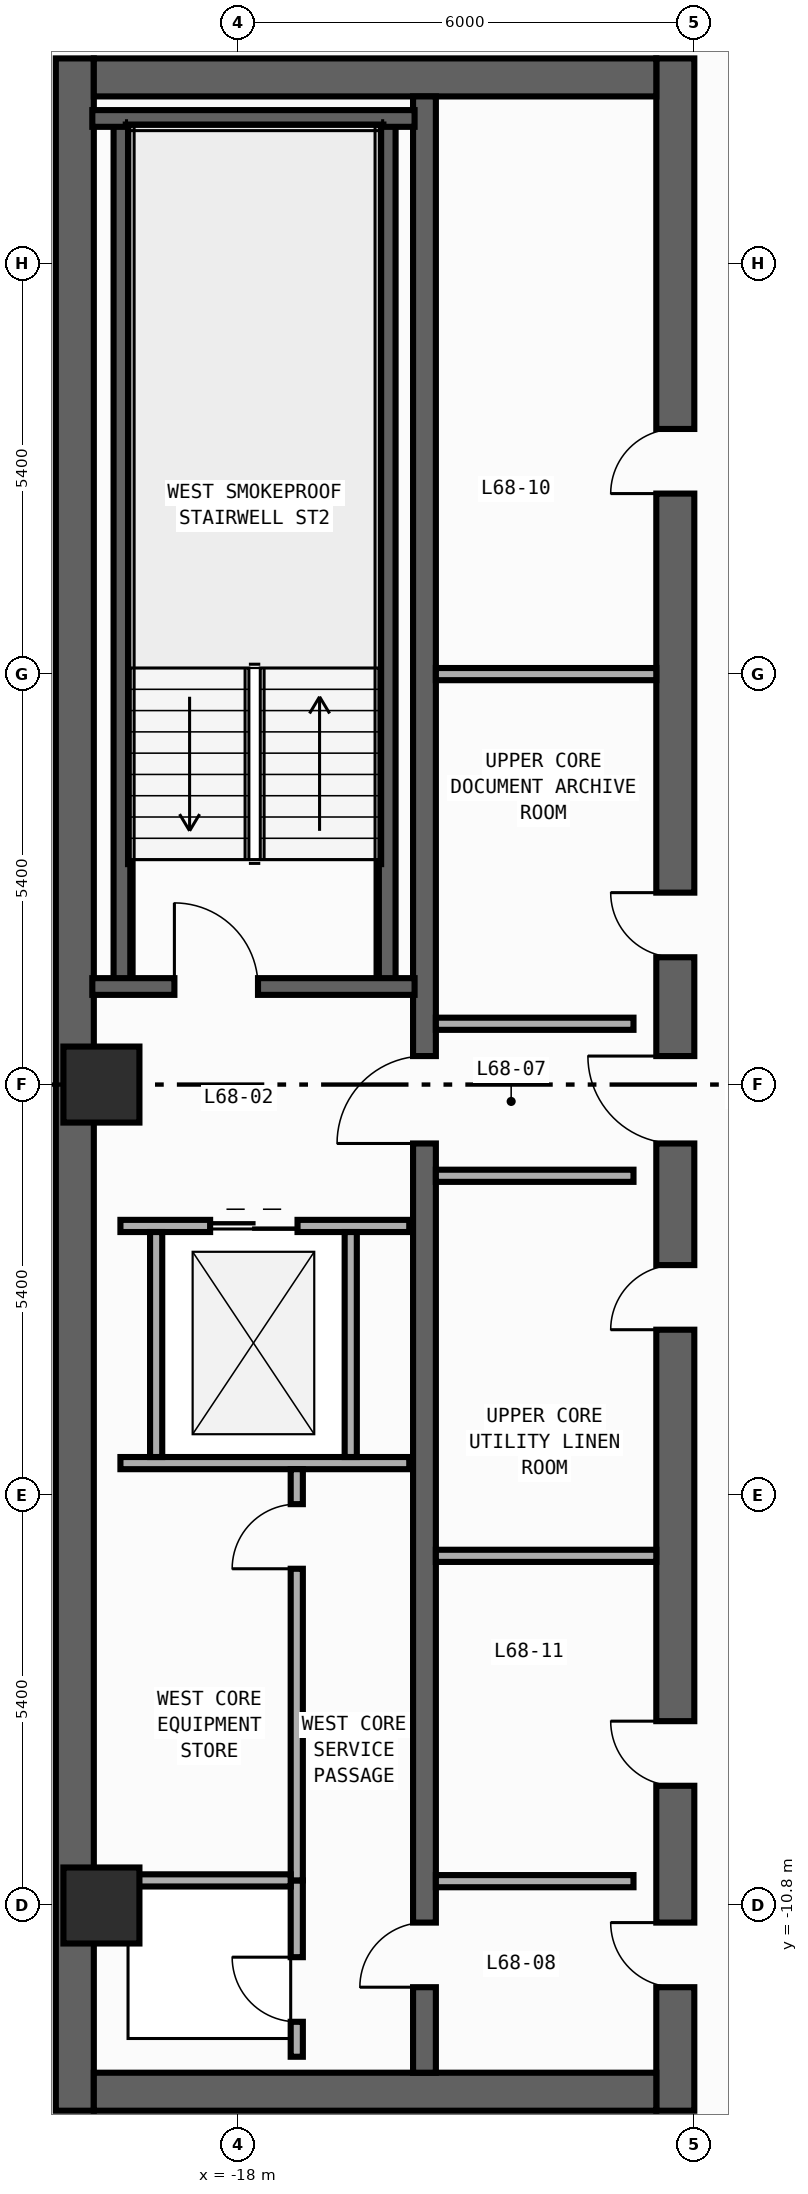
"""IFC4 building model, lengths in metres.
Left out: names, types, materials, properties, quantities, classifications, styles, units other than length and angle.
Written with IfcOpenShell. Run it as: python <this file> out.ifc"""

import sys

from ifc_helpers import new_model, si_unit, direction, frame, frame_2d, origin, origin_2d, place, context, subcontext, project, spatial, rectangle, circle, extrude, element, fill, save


model = new_model("IFC4")
c1 = context("Model", 3, precision=1e-05, world=origin(), true_north=direction((0.0, 1.0)))
c2 = subcontext(c1, "Body", "Model", "MODEL_VIEW")
j1 = project(units=[si_unit("LENGTHUNIT", "METRE"), si_unit("PLANEANGLEUNIT", "RADIAN")], contexts=[c1])
p1 = place(None, origin())
s1 = spatial("IfcSite", under=j1, at=p1, CompositionType="ELEMENT")
p2 = place(p1, origin())
s2 = spatial("IfcBuilding", under=s1, at=p2, CompositionType="ELEMENT")
p3 = place(p2, frame((0.0, 0.0, 285.2)))
s3 = spatial("IfcBuildingStorey", under=s2, at=p3, CompositionType="ELEMENT", Elevation=285.2)
p4 = place(p3, frame((-20.15, -13.5, 0.0), z_axis=(0.0, 0.0, 1.0), x_axis=(0.0, 1.0, 0.0)))
e1 = element("IfcWall", 1, at=p4, inside=s3, PredefinedType="SHEAR", context=c2, shape_type="SweptSolid", body=[
    extrude(rectangle(XDim=27.0, YDim=0.5, at=frame_2d((13.5, 0.0))), origin(), (0.0, 0.0, 1.0), 3.54),
])
p5 = place(p3, frame((-12.25, -13.5, 0.0), z_axis=(0.0, 0.0, 1.0), x_axis=(0.0, 1.0, 0.0)))
e2 = element("IfcWall", 2, at=p5, inside=s3, PredefinedType="SHEAR", context=c2, shape_type="SweptSolid", body=[
    extrude(rectangle(XDim=27.0, YDim=0.5, at=frame_2d((13.5, 0.0))), origin(), (0.0, 0.0, 1.0), 3.54),
])
p6 = place(p5, frame((15.175, 0.0, 0.0)))
e3 = element("IfcOpeningElement", 3, at=p6, cuts=e2, PredefinedType="OPENING", context=c2, shape_type="SweptSolid", body=[
    extrude(rectangle(XDim=0.85, YDim=2.1, at=frame_2d((0.425, 1.05))), frame((0.0, 0.26, 0.0), z_axis=(0.0, -1.0, 0.0), x_axis=(1.0, 0.0, 0.0)), (0.0, 0.0, 1.0), 0.52),
])
p7 = place(p5, frame((21.275, 0.0, 0.0)))
e4 = element("IfcOpeningElement", 4, at=p7, cuts=e2, PredefinedType="OPENING", context=c2, shape_type="SweptSolid", body=[
    extrude(rectangle(XDim=0.85, YDim=2.1, at=frame_2d((0.425, 1.05))), frame((0.0, 0.26, 0.0), z_axis=(0.0, -1.0, 0.0), x_axis=(1.0, 0.0, 0.0)), (0.0, 0.0, 1.0), 0.52),
])
p8 = place(p5, frame((4.275, 0.0, 0.0)))
e5 = element("IfcOpeningElement", 5, at=p8, cuts=e2, PredefinedType="OPENING", context=c2, shape_type="SweptSolid", body=[
    extrude(rectangle(XDim=0.85, YDim=2.1, at=frame_2d((0.425, 1.05))), frame((0.0, 0.26, 0.0), z_axis=(0.0, -1.0, 0.0), x_axis=(1.0, 0.0, 0.0)), (0.0, 0.0, 1.0), 0.52),
])
p9 = place(p5, frame((10.275, 0.0, 0.0)))
e6 = element("IfcOpeningElement", 6, at=p9, cuts=e2, PredefinedType="OPENING", context=c2, shape_type="SweptSolid", body=[
    extrude(rectangle(XDim=0.85, YDim=2.1, at=frame_2d((0.425, 1.05))), frame((0.0, 0.26, 0.0), z_axis=(0.0, -1.0, 0.0), x_axis=(1.0, 0.0, 0.0)), (0.0, 0.0, 1.0), 0.52),
])
p10 = place(p5, frame((12.725, 0.0, 0.0)))
e7 = element("IfcOpeningElement", 7, at=p10, cuts=e2, PredefinedType="OPENING", context=c2, shape_type="SweptSolid", body=[
    extrude(rectangle(XDim=1.15, YDim=2.2, at=frame_2d((0.575, 1.1))), frame((0.0, 0.26, 0.0), z_axis=(0.0, -1.0, 0.0), x_axis=(1.0, 0.0, 0.0)), (0.0, 0.0, 1.0), 0.52),
])
p11 = place(p5, frame((1.625, 0.0, 0.0)))
e8 = element("IfcOpeningElement", 8, at=p11, cuts=e2, PredefinedType="OPENING", context=c2, shape_type="SweptSolid", body=[
    extrude(rectangle(XDim=0.85, YDim=2.1, at=frame_2d((0.425, 1.05))), frame((0.0, 0.26, 0.0), z_axis=(0.0, -1.0, 0.0), x_axis=(1.0, 0.0, 0.0)), (0.0, 0.0, 1.0), 0.52),
])
for number, where, z_axis, x_axis in (
    (9, (-19.9, -13.25, 0.0), (0.0, 0.0, 1.0), (1.0, 0.0, 0.0)),
    (10, (-19.9, 13.25, 0.0), (0.0, 0.0, 1.0), (1.0, 0.0, 0.0)),
):
    element("IfcWall", number, at=place(p3, frame(where, z_axis=z_axis, x_axis=x_axis)), inside=s3, PredefinedType="SHEAR", context=c2, shape_type="SweptSolid", body=[
        extrude(rectangle(XDim=7.4, YDim=0.5, at=frame_2d((3.7, 0.0))), origin(), (0.0, 0.0, 1.0), 3.54),
    ])
p12 = place(p3, frame((-15.55, -13.0, 0.0), z_axis=(0.0, 0.0, 1.0), x_axis=(0.0, 1.0, 0.0)))
e11 = element("IfcWall", 11, at=p12, inside=s3, PredefinedType="SHEAR", context=c2, shape_type="SweptSolid", body=[
    extrude(rectangle(XDim=26.0, YDim=0.3, at=frame_2d((13.0, 0.0))), origin(), (0.0, 0.0, 1.0), 3.54),
])
p13 = place(p12, frame((12.225, 0.0, 0.0)))
e12 = element("IfcOpeningElement", 12, at=p13, cuts=e11, PredefinedType="OPENING", context=c2, shape_type="SweptSolid", body=[
    extrude(rectangle(XDim=1.15, YDim=2.2, at=frame_2d((0.575, 1.1))), frame((0.0, 0.16, 0.0), z_axis=(0.0, -1.0, 0.0), x_axis=(1.0, 0.0, 0.0)), (0.0, 0.0, 1.0), 0.32),
])
p14 = place(p12, frame((1.125, 0.0, 0.0)))
e13 = element("IfcOpeningElement", 13, at=p14, cuts=e11, PredefinedType="OPENING", context=c2, shape_type="SweptSolid", body=[
    extrude(rectangle(XDim=0.85, YDim=2.1, at=frame_2d((0.425, 1.05))), frame((0.0, 0.16, 0.0), z_axis=(0.0, -1.0, 0.0), x_axis=(1.0, 0.0, 0.0)), (0.0, 0.0, 1.0), 0.32),
])
for number, where, z_axis, x_axis in (
    (14, (-16.04, 1.29, 0.0), (0.0, 0.0, 1.0), (0.0, 1.0, 0.0)),
    (15, (-19.53, 1.29, 0.0), (0.0, 0.0, 1.0), (0.0, 1.0, 0.0)),
):
    element("IfcWall", number, at=place(p3, frame(where, z_axis=z_axis, x_axis=x_axis)), inside=s3, PredefinedType="SHEAR", context=c2, shape_type="SweptSolid", body=[
        extrude(rectangle(XDim=11.42, YDim=0.22, at=frame_2d((5.71, 0.0))), origin(), (0.0, 0.0, 1.0), 3.54),
    ])
p15 = place(p3, frame((-19.92, 12.71, 0.0), z_axis=(0.0, 0.0, 1.0), x_axis=(1.0, 0.0, 0.0)))
e16 = element("IfcWall", 16, at=p15, inside=s3, PredefinedType="SHEAR", context=c2, shape_type="SweptSolid", body=[
    extrude(rectangle(XDim=4.24, YDim=0.22, at=frame_2d((2.12, 0.0))), origin(), (0.0, 0.0, 1.0), 3.54),
])
p16 = place(p3, frame((-19.92, 1.29, 0.0), z_axis=(0.0, 0.0, 1.0), x_axis=(1.0, 0.0, 0.0)))
e17 = element("IfcWall", 17, at=p16, inside=s3, PredefinedType="SHEAR", context=c2, shape_type="SweptSolid", body=[
    extrude(rectangle(XDim=4.24, YDim=0.22, at=frame_2d((2.12, 0.0))), origin(), (0.0, 0.0, 1.0), 3.54),
])
p17 = place(p16, frame((1.08, 0.0, 0.0)))
e18 = element("IfcOpeningElement", 18, at=p17, cuts=e17, PredefinedType="OPENING", context=c2, shape_type="SweptSolid", body=[
    extrude(rectangle(XDim=1.1, YDim=2.2, at=frame_2d((0.55, 1.1))), frame((0.0, 0.12, 0.0), z_axis=(0.0, -1.0, 0.0), x_axis=(1.0, 0.0, 0.0)), (0.0, 0.0, 1.0), 0.24),
])
for number, where, z_axis, x_axis in (
    (19, (-19.8, -10.8, 0.0), (0.0, 0.0, 1.0), (1.0, 0.0, 0.0)),
    (20, (-19.8, 0.0, 0.0), (0.0, 0.0, 1.0), (1.0, 0.0, 0.0)),
):
    element("IfcColumn", number, at=place(p3, frame(where, z_axis=z_axis, x_axis=x_axis)), inside=s3, PredefinedType="COLUMN", context=c2, shape_type="SweptSolid", body=[
        extrude(circle(Radius=0.5, at=origin_2d()), origin(), (0.0, 0.0, 1.0), 3.8),
    ])
p18 = place(p3, frame((-19.55, -1.86, 0.0), z_axis=(0.0, 0.0, 1.0), x_axis=(1.0, 0.0, 0.0)))
e21 = element("IfcWall", 21, at=p18, inside=s3, PredefinedType="STANDARD", context=c2, shape_type="SweptSolid", body=[
    extrude(rectangle(XDim=3.8, YDim=0.16, at=frame_2d((1.9, 0.0))), origin(), (0.0, 0.0, 1.0), 3.54),
])
p19 = place(p18, frame((1.18, 0.0, 0.0)))
e22 = element("IfcOpeningElement", 22, at=p19, cuts=e21, PredefinedType="OPENING", context=c2, shape_type="SweptSolid", body=[
    extrude(rectangle(XDim=1.15, YDim=2.2, at=frame_2d((0.575, 1.1))), frame((0.0, 0.09, 0.0), z_axis=(0.0, -1.0, 0.0), x_axis=(1.0, 0.0, 0.0)), (0.0, 0.0, 1.0), 0.18),
])
p20 = place(p3, frame((-19.55, -4.98, 0.0), z_axis=(0.0, 0.0, 1.0), x_axis=(1.0, 0.0, 0.0)))
e23 = element("IfcWall", 23, at=p20, inside=s3, PredefinedType="STANDARD", context=c2, shape_type="SweptSolid", body=[
    extrude(rectangle(XDim=3.8, YDim=0.16, at=frame_2d((1.9, 0.0))), origin(), (0.0, 0.0, 1.0), 3.54),
])
for number, where, z_axis, x_axis in (
    (24, (-19.08, -4.9, 0.0), (0.0, 0.0, 1.0), (0.0, 1.0, 0.0)),
    (25, (-16.52, -4.9, 0.0), (0.0, 0.0, 1.0), (0.0, 1.0, 0.0)),
):
    element("IfcWall", number, at=place(p3, frame(where, z_axis=z_axis, x_axis=x_axis)), inside=s3, PredefinedType="STANDARD", context=c2, shape_type="SweptSolid", body=[
        extrude(rectangle(XDim=2.96, YDim=0.16, at=frame_2d((1.48, 0.0))), origin(), (0.0, 0.0, 1.0), 3.54),
    ])
for number, where, z_axis, x_axis in (
    (26, (-15.4, 0.8, 0.0), (0.0, 0.0, 1.0), (1.0, 0.0, 0.0)),
    (27, (-15.4, -1.2, 0.0), (0.0, 0.0, 1.0), (1.0, 0.0, 0.0)),
    (28, (-15.4, -10.48, 0.0), (0.0, 0.0, 1.0), (1.0, 0.0, 0.0)),
):
    element("IfcWall", number, at=place(p3, frame(where, z_axis=z_axis, x_axis=x_axis)), inside=s3, PredefinedType="STANDARD", context=c2, shape_type="SweptSolid", body=[
        extrude(rectangle(XDim=2.6, YDim=0.16, at=frame_2d((1.3, 0.0))), origin(), (0.0, 0.0, 1.0), 3.54),
    ])
p21 = place(p3, frame((-17.23, -12.79, 0.0), z_axis=(0.0, 0.0, 1.0), x_axis=(0.0, 1.0, 0.0)))
e29 = element("IfcWall", 29, at=p21, inside=s3, PredefinedType="PARTITIONING", context=c2, shape_type="SweptSolid", body=[
    extrude(rectangle(XDim=2.32, YDim=0.16, at=frame_2d((1.16, 0.0))), origin(), (0.0, 0.0, 1.0), 3.54),
])
p22 = place(p21, frame((0.46, 0.0, 0.0)))
e30 = element("IfcOpeningElement", 30, at=p22, cuts=e29, PredefinedType="OPENING", context=c2, shape_type="SweptSolid", body=[
    extrude(rectangle(XDim=0.85, YDim=2.1, at=frame_2d((0.425, 1.05))), frame((0.0, 0.09, 0.0), z_axis=(0.0, -1.0, 0.0), x_axis=(1.0, 0.0, 0.0)), (0.0, 0.0, 1.0), 0.18),
])
p23 = place(p3, frame((-17.23, -10.47, 0.0), z_axis=(0.0, 0.0, 1.0), x_axis=(0.0, 1.0, 0.0)))
e31 = element("IfcWall", 31, at=p23, inside=s3, PredefinedType="PARTITIONING", context=c2, shape_type="SweptSolid", body=[
    extrude(rectangle(XDim=5.41, YDim=0.16, at=frame_2d((2.705, 0.0))), origin(), (0.0, 0.0, 1.0), 3.54),
])
p24 = place(p23, frame((4.1, 0.0, 0.0)))
e32 = element("IfcOpeningElement", 32, at=p24, cuts=e31, PredefinedType="OPENING", context=c2, shape_type="SweptSolid", body=[
    extrude(rectangle(XDim=0.85, YDim=2.1, at=frame_2d((0.425, 1.05))), frame((0.0, 0.09, 0.0), z_axis=(0.0, -1.0, 0.0), x_axis=(1.0, 0.0, 0.0)), (0.0, 0.0, 1.0), 0.18),
])
p25 = place(p3, frame((-19.75, -10.47, 0.0), z_axis=(0.0, 0.0, 1.0), x_axis=(1.0, 0.0, 0.0)))
e33 = element("IfcWall", 33, at=p25, inside=s3, PredefinedType="PARTITIONING", context=c2, shape_type="SweptSolid", body=[
    extrude(rectangle(XDim=2.44, YDim=0.16, at=frame_2d((1.22, 0.0))), origin(), (0.0, 0.0, 1.0), 3.54),
])
for number, where, z_axis, x_axis in (
    (34, (-15.4, 5.4, 0.0), (0.0, 0.0, 1.0), (1.0, 0.0, 0.0)),
    (35, (-15.4, -6.2, 0.0), (0.0, 0.0, 1.0), (1.0, 0.0, 0.0)),
):
    element("IfcWall", number, at=place(p3, frame(where, z_axis=z_axis, x_axis=x_axis)), inside=s3, PredefinedType="PARTITIONING", context=c2, shape_type="SweptSolid", body=[
        extrude(rectangle(XDim=2.9, YDim=0.16, at=frame_2d((1.45, 0.0))), origin(), (0.0, 0.0, 1.0), 3.54),
    ])
p26 = place(p17, origin())
e36 = element("IfcDoor", 36, at=p26, inside=s3, OperationType="SINGLE_SWING_LEFT", PredefinedType="DOOR", context=c2, shape_type="SweptSolid", body=[
    extrude(rectangle(XDim=1.1, YDim=2.2, at=frame_2d((0.55, 1.1))), frame((0.0, 0.025, 0.0), z_axis=(0.0, -1.0, 0.0), x_axis=(1.0, 0.0, 0.0)), (0.0, 0.0, 1.0), 0.05),
])
fill(e18, e36)
p27 = place(p6, origin())
e37 = element("IfcDoor", 37, at=p27, inside=s3, OperationType="SINGLE_SWING_RIGHT", PredefinedType="DOOR", context=c2, shape_type="SweptSolid", body=[
    extrude(rectangle(XDim=0.85, YDim=2.1, at=frame_2d((0.425, 1.05))), frame((0.0, 0.025, 0.0), z_axis=(0.0, -1.0, 0.0), x_axis=(1.0, 0.0, 0.0)), (0.0, 0.0, 1.0), 0.05),
])
fill(e3, e37)
p28 = place(p7, origin())
e38 = element("IfcDoor", 38, at=p28, inside=s3, OperationType="SINGLE_SWING_LEFT", PredefinedType="DOOR", context=c2, shape_type="SweptSolid", body=[
    extrude(rectangle(XDim=0.85, YDim=2.1, at=frame_2d((0.425, 1.05))), frame((0.0, 0.025, 0.0), z_axis=(0.0, -1.0, 0.0), x_axis=(1.0, 0.0, 0.0)), (0.0, 0.0, 1.0), 0.05),
])
fill(e4, e38)
p29 = place(p8, origin())
e39 = element("IfcDoor", 39, at=p29, inside=s3, OperationType="SINGLE_SWING_RIGHT", PredefinedType="DOOR", context=c2, shape_type="SweptSolid", body=[
    extrude(rectangle(XDim=0.85, YDim=2.1, at=frame_2d((0.425, 1.05))), frame((0.0, 0.025, 0.0), z_axis=(0.0, -1.0, 0.0), x_axis=(1.0, 0.0, 0.0)), (0.0, 0.0, 1.0), 0.05),
])
fill(e5, e39)
p30 = place(p9, origin())
e40 = element("IfcDoor", 40, at=p30, inside=s3, OperationType="SINGLE_SWING_LEFT", PredefinedType="DOOR", context=c2, shape_type="SweptSolid", body=[
    extrude(rectangle(XDim=0.85, YDim=2.1, at=frame_2d((0.425, 1.05))), frame((0.0, 0.025, 0.0), z_axis=(0.0, -1.0, 0.0), x_axis=(1.0, 0.0, 0.0)), (0.0, 0.0, 1.0), 0.05),
])
fill(e6, e40)
p31 = place(p10, origin())
e41 = element("IfcDoor", 41, at=p31, inside=s3, OperationType="SINGLE_SWING_RIGHT", PredefinedType="DOOR", context=c2, shape_type="SweptSolid", body=[
    extrude(rectangle(XDim=1.15, YDim=2.2, at=frame_2d((0.575, 1.1))), frame((0.0, 0.025, 0.0), z_axis=(0.0, -1.0, 0.0), x_axis=(1.0, 0.0, 0.0)), (0.0, 0.0, 1.0), 0.05),
])
fill(e7, e41)
p32 = place(p13, origin())
e42 = element("IfcDoor", 42, at=p32, inside=s3, OperationType="SINGLE_SWING_LEFT", PredefinedType="DOOR", context=c2, shape_type="SweptSolid", body=[
    extrude(rectangle(XDim=1.15, YDim=2.2, at=frame_2d((0.575, 1.1))), frame((0.0, 0.025, 0.0), z_axis=(0.0, -1.0, 0.0), x_axis=(1.0, 0.0, 0.0)), (0.0, 0.0, 1.0), 0.05),
])
fill(e12, e42)
p33 = place(p11, origin())
e43 = element("IfcDoor", 43, at=p33, inside=s3, OperationType="SINGLE_SWING_RIGHT", PredefinedType="DOOR", context=c2, shape_type="SweptSolid", body=[
    extrude(rectangle(XDim=0.85, YDim=2.1, at=frame_2d((0.425, 1.05))), frame((0.0, 0.025, 0.0), z_axis=(0.0, -1.0, 0.0), x_axis=(1.0, 0.0, 0.0)), (0.0, 0.0, 1.0), 0.05),
])
fill(e8, e43)
p34 = place(p14, origin())
e44 = element("IfcDoor", 44, at=p34, inside=s3, OperationType="SINGLE_SWING_LEFT", PredefinedType="DOOR", context=c2, shape_type="SweptSolid", body=[
    extrude(rectangle(XDim=0.85, YDim=2.1, at=frame_2d((0.425, 1.05))), frame((0.0, 0.025, 0.0), z_axis=(0.0, -1.0, 0.0), x_axis=(1.0, 0.0, 0.0)), (0.0, 0.0, 1.0), 0.05),
])
fill(e13, e44)
p35 = place(p19, origin())
e45 = element("IfcDoor", 45, at=p35, inside=s3, OperationType="DOUBLE_DOOR_SLIDING", PredefinedType="DOOR", context=c2, shape_type="SweptSolid", body=[
    extrude(rectangle(XDim=1.15, YDim=2.2, at=frame_2d((0.575, 1.1))), frame((0.0, 0.025, 0.0), z_axis=(0.0, -1.0, 0.0), x_axis=(1.0, 0.0, 0.0)), (0.0, 0.0, 1.0), 0.05),
])
fill(e22, e45)
p36 = place(p22, origin())
e46 = element("IfcDoor", 46, at=p36, inside=s3, OperationType="SINGLE_SWING_RIGHT", PredefinedType="DOOR", context=c2, shape_type="SweptSolid", body=[
    extrude(rectangle(XDim=0.85, YDim=2.1, at=frame_2d((0.425, 1.05))), frame((0.0, 0.025, 0.0), z_axis=(0.0, -1.0, 0.0), x_axis=(1.0, 0.0, 0.0)), (0.0, 0.0, 1.0), 0.05),
])
fill(e30, e46)
p37 = place(p24, origin())
e47 = element("IfcDoor", 47, at=p37, inside=s3, OperationType="SINGLE_SWING_LEFT", PredefinedType="DOOR", context=c2, shape_type="SweptSolid", body=[
    extrude(rectangle(XDim=0.85, YDim=2.1, at=frame_2d((0.425, 1.05))), frame((0.0, 0.025, 0.0), z_axis=(0.0, -1.0, 0.0), x_axis=(1.0, 0.0, 0.0)), (0.0, 0.0, 1.0), 0.05),
])
fill(e32, e47)
save(model, sys.argv[1])
